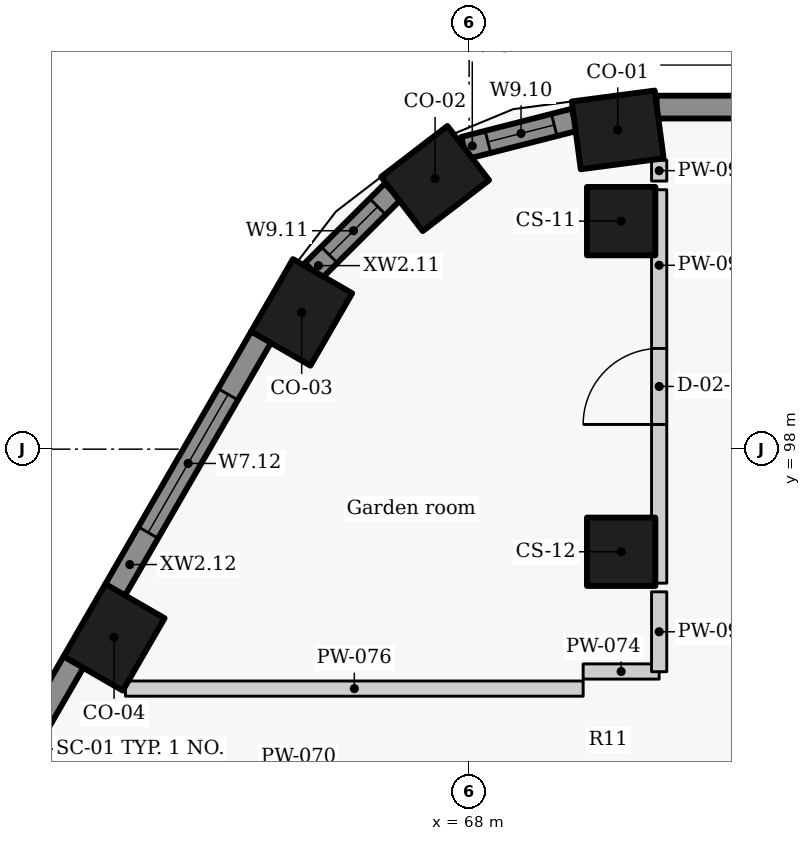
"""IFC4 building model, lengths in metres.
Left out: names, types, materials, properties, quantities, classifications, styles, units other than length and angle.
Written with IfcOpenShell. Run it as: python <this file> out.ifc"""

import sys

from ifc_helpers import new_model, si_unit, direction, frame, frame_2d, origin, origin_2d, place, context, subcontext, project, spatial, rectangle, extrude, element, fill, save


model = new_model("IFC4")
c1 = context("Model", 3, precision=1e-05, world=origin(), true_north=direction((0.0, 1.0)))
c2 = subcontext(c1, "Body", "Model", "MODEL_VIEW")
j1 = project(units=[si_unit("LENGTHUNIT", "METRE"), si_unit("PLANEANGLEUNIT", "RADIAN")], contexts=[c1])
p1 = place(None, origin())
s1 = spatial("IfcSite", under=j1, at=p1, CompositionType="ELEMENT")
p2 = place(p1, origin())
s2 = spatial("IfcBuilding", under=s1, at=p2, CompositionType="ELEMENT")
p3 = place(p2, frame((0.0, 0.0, 269.1)))
s3 = spatial("IfcBuildingStorey", under=s2, at=p3, CompositionType="ELEMENT", Elevation=269.1)
for number, where, z_axis, x_axis in (
    (1, (69.955, 102.2, 0.0), (0.0, 0.0, 1.0), (-0.991, -0.131, 0.0)),
    (2, (67.552, 101.56, 0.0), (0.0, 0.0, 1.0), (-0.793, -0.609, 0.0)),
    (3, (65.797, 99.8, 0.0), (0.0, 0.0, 1.0), (-0.5, -0.866, 0.0)),
    (4, (63.329, 95.525, 0.0), (0.0, 0.0, 1.0), (-0.5, -0.866, 0.0)),
):
    element("IfcColumn", number, at=place(p3, frame(where, z_axis=z_axis, x_axis=x_axis)), inside=s3, PredefinedType="COLUMN", context=c2, shape_type="SweptSolid", body=[
        extrude(rectangle(XDim=1.1, YDim=0.9, at=origin_2d()), origin(), (0.0, 0.0, 1.0), 3.3),
    ])
for number, where, z_axis, x_axis in (
    (5, (70.0, 101.0, 0.0), (0.0, 0.0, 1.0), (0.0, -1.0, 0.0)),
    (6, (70.0, 96.65, 0.0), (0.0, 0.0, 1.0), (0.0, -1.0, 0.0)),
):
    element("IfcColumn", number, at=place(p3, frame(where, z_axis=z_axis, x_axis=x_axis)), inside=s3, PredefinedType="COLUMN", context=c2, shape_type="SweptSolid", body=[
        extrude(rectangle(XDim=0.9, YDim=0.9, at=origin_2d()), origin(), (0.0, 0.0, 1.0), 3.3),
    ])
p4 = place(p3, frame((89.499, 102.5, 0.0), z_axis=(0.0, 0.0, 1.0), x_axis=(-1.0, 0.0, 0.0)))
e7 = element("IfcWall", 7, at=p4, inside=s3, PredefinedType="SOLIDWALL", context=c2, shape_type="SweptSolid", body=[
    extrude(rectangle(XDim=19.033, YDim=0.3, at=frame_2d((9.517, 0.0))), origin(), (0.0, 0.0, 1.0), 2.125),
])
p5 = place(p3, frame((69.386, 102.333, 0.0), z_axis=(0.0, 0.0, 1.0), x_axis=(-0.968895303033, -0.247470991757, 0.0)))
e8 = element("IfcWall", 8, at=p5, inside=s3, PredefinedType="SOLIDWALL", context=c2, shape_type="SweptSolid", body=[
    extrude(rectangle(XDim=1.5, YDim=0.3, at=frame_2d((0.75, 0.0))), origin(), (0.0, 0.0, 1.0), 2.125),
])
p6 = place(p5, frame((0.276, 0.0, 0.9)))
e9 = element("IfcOpeningElement", 9, at=p6, cuts=e8, PredefinedType="OPENING", context=c2, shape_type="SweptSolid", body=[
    extrude(rectangle(XDim=0.9, YDim=1.1, at=frame_2d((0.45, 0.55))), frame((0.0, 0.16, 0.0), z_axis=(0.0, -1.0, 0.0), x_axis=(1.0, 0.0, 0.0)), (0.0, 0.0, 1.0), 0.32),
])
p7 = place(p3, frame((66.996, 101.388, 0.0), z_axis=(0.0, 0.0, 1.0), x_axis=(-0.708589353117, -0.705621094249, 0.0)))
e10 = element("IfcWall", 10, at=p7, inside=s3, PredefinedType="SOLIDWALL", context=c2, shape_type="SweptSolid", body=[
    extrude(rectangle(XDim=1.48, YDim=0.3, at=frame_2d((0.74, 0.0))), origin(), (0.0, 0.0, 1.0), 2.125),
])
p8 = place(p7, frame((0.28, 0.0, 0.9)))
e11 = element("IfcOpeningElement", 11, at=p8, cuts=e10, PredefinedType="OPENING", context=c2, shape_type="SweptSolid", body=[
    extrude(rectangle(XDim=0.9, YDim=1.1, at=frame_2d((0.45, 0.55))), frame((0.0, 0.16, 0.0), z_axis=(0.0, -1.0, 0.0), x_axis=(1.0, 0.0, 0.0)), (0.0, 0.0, 1.0), 0.32),
])
p9 = place(p3, frame((65.264, 99.477, 0.0), z_axis=(0.0, 0.0, 1.0), x_axis=(-0.499984490703, -0.866034357896, 0.0)))
e12 = element("IfcWall", 12, at=p9, inside=s3, PredefinedType="SOLIDWALL", context=c2, shape_type="SweptSolid", body=[
    extrude(rectangle(XDim=3.844, YDim=0.3, at=frame_2d((1.922, 0.0))), origin(), (0.0, 0.0, 1.0), 2.125),
])
p10 = place(p9, frame((0.872, 0.0, 0.9)))
e13 = element("IfcOpeningElement", 13, at=p10, cuts=e12, PredefinedType="OPENING", context=c2, shape_type="SweptSolid", body=[
    extrude(rectangle(XDim=2.1, YDim=1.1, at=frame_2d((1.05, 0.55))), frame((0.0, 0.16, 0.0), z_axis=(0.0, -1.0, 0.0), x_axis=(1.0, 0.0, 0.0)), (0.0, 0.0, 1.0), 0.32),
])
p11 = place(p3, frame((62.796, 95.202, 0.0), z_axis=(0.0, 0.0, 1.0), x_axis=(-0.499984490703, -0.866034357896, 0.0)))
e14 = element("IfcWall", 14, at=p11, inside=s3, PredefinedType="SOLIDWALL", context=c2, shape_type="SweptSolid", body=[
    extrude(rectangle(XDim=3.844, YDim=0.3, at=frame_2d((1.922, 0.0))), origin(), (0.0, 0.0, 1.0), 2.125),
])
p12 = place(p11, frame((2.365, 0.0, 0.9)))
e15 = element("IfcOpeningElement", 15, at=p12, cuts=e14, PredefinedType="OPENING", context=c2, shape_type="SweptSolid", body=[
    extrude(rectangle(XDim=0.9, YDim=1.1, at=frame_2d((0.45, 0.55))), frame((0.0, 0.16, 0.0), z_axis=(0.0, -1.0, 0.0), x_axis=(1.0, 0.0, 0.0)), (0.0, 0.0, 1.0), 0.32),
])
p13 = place(p3, frame((69.5, 95.075, 0.0), z_axis=(0.0, 0.0, 1.0), x_axis=(1.0, 0.0, 0.0)))
e16 = element("IfcWall", 16, at=p13, inside=s3, PredefinedType="PARTITIONING", context=c2, shape_type="SweptSolid", body=[
    extrude(rectangle(XDim=1.0, YDim=0.2, at=frame_2d((0.5, 0.0))), origin(), (0.0, 0.0, 1.0), 2.505),
])
p14 = place(p3, frame((63.479, 94.85, 0.0), z_axis=(0.0, 0.0, 1.0), x_axis=(1.0, 0.0, 0.0)))
e17 = element("IfcWall", 17, at=p14, inside=s3, PredefinedType="PARTITIONING", context=c2, shape_type="SweptSolid", body=[
    extrude(rectangle(XDim=6.021, YDim=0.2, at=frame_2d((3.01, 0.0))), origin(), (0.0, 0.0, 1.0), 3.025),
])
p15 = place(p3, frame((70.5, 95.072, 0.0), z_axis=(0.0, 0.0, 1.0), x_axis=(0.0, 1.0, 0.0)))
e18 = element("IfcWall", 18, at=p15, inside=s3, PredefinedType="PARTITIONING", context=c2, shape_type="SweptSolid", body=[
    extrude(rectangle(XDim=1.051, YDim=0.2, at=frame_2d((0.525, 0.0))), origin(), (0.0, 0.0, 1.0), 3.025),
])
p16 = place(p3, frame((70.5, 96.237, 0.0), z_axis=(0.0, 0.0, 1.0), x_axis=(0.0, 1.0, 0.0)))
e19 = element("IfcWall", 19, at=p16, inside=s3, PredefinedType="PARTITIONING", context=c2, shape_type="SweptSolid", body=[
    extrude(rectangle(XDim=5.176, YDim=0.2, at=frame_2d((2.588, 0.0))), origin(), (0.0, 0.0, 1.0), 3.025),
])
p17 = place(p16, frame((2.088, 0.0, 0.0)))
e20 = element("IfcOpeningElement", 20, at=p17, cuts=e19, PredefinedType="OPENING", context=c2, shape_type="SweptSolid", body=[
    extrude(rectangle(XDim=1.0, YDim=2.1, at=frame_2d((0.5, 1.05))), frame((0.0, 0.11, 0.0), z_axis=(0.0, -1.0, 0.0), x_axis=(1.0, 0.0, 0.0)), (0.0, 0.0, 1.0), 0.22),
])
p18 = place(p3, frame((70.5, 101.527, 0.0), z_axis=(0.0, 0.0, 1.0), x_axis=(0.0, 1.0, 0.0)))
e21 = element("IfcWall", 21, at=p18, inside=s3, PredefinedType="PARTITIONING", context=c2, shape_type="SweptSolid", body=[
    extrude(rectangle(XDim=0.274, YDim=0.2, at=frame_2d((0.137, 0.0))), origin(), (0.0, 0.0, 1.0), 3.025),
])
p19 = place(p6, origin())
e22 = element("IfcWindow", 22, at=p19, inside=s3, PartitioningType="SINGLE_PANEL", PredefinedType="WINDOW", context=c2, shape_type="SweptSolid", body=[
    extrude(rectangle(XDim=0.9, YDim=1.1, at=frame_2d((0.45, 0.55))), frame((0.0, 0.03, 0.0), z_axis=(0.0, -1.0, 0.0), x_axis=(1.0, 0.0, 0.0)), (0.0, 0.0, 1.0), 0.06),
])
fill(e9, e22)
p20 = place(p8, origin())
e23 = element("IfcWindow", 23, at=p20, inside=s3, PartitioningType="SINGLE_PANEL", PredefinedType="WINDOW", context=c2, shape_type="SweptSolid", body=[
    extrude(rectangle(XDim=0.9, YDim=1.1, at=frame_2d((0.45, 0.55))), frame((0.0, 0.03, 0.0), z_axis=(0.0, -1.0, 0.0), x_axis=(1.0, 0.0, 0.0)), (0.0, 0.0, 1.0), 0.06),
])
fill(e11, e23)
p21 = place(p10, origin())
e24 = element("IfcWindow", 24, at=p21, inside=s3, PartitioningType="SINGLE_PANEL", PredefinedType="WINDOW", context=c2, shape_type="SweptSolid", body=[
    extrude(rectangle(XDim=2.1, YDim=1.1, at=frame_2d((1.05, 0.55))), frame((0.0, 0.03, 0.0), z_axis=(0.0, -1.0, 0.0), x_axis=(1.0, 0.0, 0.0)), (0.0, 0.0, 1.0), 0.06),
])
fill(e13, e24)
p22 = place(p17, origin())
e25 = element("IfcDoor", 25, at=p22, inside=s3, OperationType="SINGLE_SWING_LEFT", PredefinedType="DOOR", context=c2, shape_type="SweptSolid", body=[
    extrude(rectangle(XDim=1.0, YDim=2.1, at=frame_2d((0.5, 1.05))), frame((0.0, 0.025, 0.0), z_axis=(0.0, -1.0, 0.0), x_axis=(1.0, 0.0, 0.0)), (0.0, 0.0, 1.0), 0.05),
])
fill(e20, e25)
save(model, sys.argv[1])
